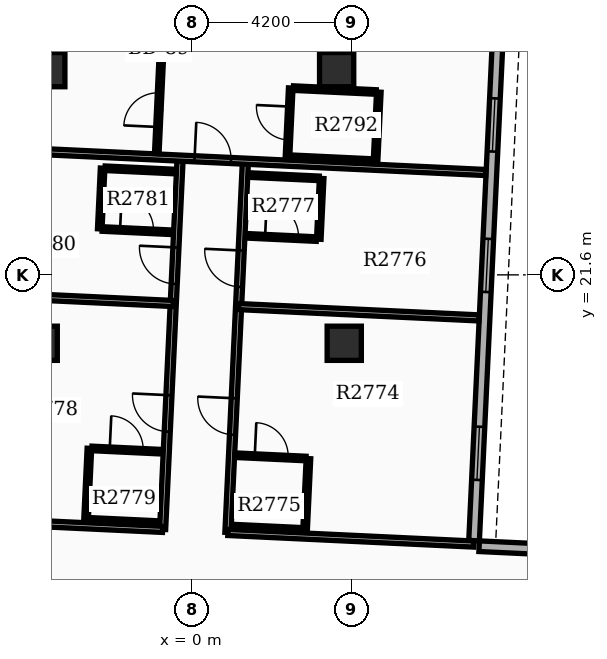
"""IFC4 building model, lengths in metres.
Left out: names, types, materials, properties, quantities, classifications, styles, units other than length and angle.
Written with IfcOpenShell. Run it as: python <this file> out.ifc"""

import sys

from ifc_helpers import new_model, si_unit, direction, frame, frame_2d, origin, origin_2d, place, context, subcontext, project, spatial, rectangle, extrude, element, fill, save


model = new_model("IFC4")
c1 = context("Model", 3, precision=1e-05, world=origin(), true_north=direction((0.0, 1.0)))
c2 = subcontext(c1, "Body", "Model", "MODEL_VIEW")
j1 = project(units=[si_unit("LENGTHUNIT", "METRE"), si_unit("PLANEANGLEUNIT", "RADIAN")], contexts=[c1])
p1 = place(None, origin())
s1 = spatial("IfcSite", under=j1, at=p1, CompositionType="ELEMENT")
p2 = place(p1, origin())
s2 = spatial("IfcBuilding", under=s1, at=p2, CompositionType="ELEMENT")
p3 = place(p2, frame((0.0, 0.0, 172.2)))
s3 = spatial("IfcBuildingStorey", under=s2, at=p3, CompositionType="ELEMENT", Elevation=172.2)
for number, where, z_axis, x_axis in (
    (1, (-4.0, 19.8, 0.0), (0.0, 0.0, 1.0), (1.0, 0.0, 0.0)),
    (2, (4.0, 19.8, 0.0), (0.0, 0.0, 1.0), (1.0, 0.0, 0.0)),
    (3, (-3.8, 27.0, 0.0), (0.0, 0.0, 1.0), (1.0, 0.0, 0.0)),
    (4, (3.8, 27.0, 0.0), (0.0, 0.0, 1.0), (1.0, 0.0, 0.0)),
):
    element("IfcColumn", number, at=place(p3, frame(where, z_axis=z_axis, x_axis=x_axis)), inside=s3, PredefinedType="COLUMN", context=c2, shape_type="SweptSolid", body=[
        extrude(rectangle(XDim=0.9, YDim=0.9, at=origin_2d()), origin(), (0.0, 0.0, 1.0), 3.9),
    ])
p4 = place(p3, frame((7.416, 14.607, 0.0), z_axis=(0.0, 0.0, 1.0), x_axis=(0.047103473814, 0.998890015344, 0.0)))
e5 = element("IfcWall", 5, at=p4, inside=s3, PredefinedType="STANDARD", context=c2, shape_type="SweptSolid", body=[
    extrude(rectangle(XDim=20.1, YDim=0.28, at=frame_2d((10.05, 0.0))), origin(), (0.0, 0.0, 1.0), 2.97),
])
p5 = place(p4, frame((1.6, 0.0, 0.8)))
e6 = element("IfcOpeningElement", 6, at=p5, cuts=e5, PredefinedType="OPENING", context=c2, shape_type="SweptSolid", body=[
    extrude(rectangle(XDim=1.4, YDim=1.6, at=frame_2d((0.7, 0.8))), frame((0.0, 0.15, 0.0), z_axis=(0.0, -1.0, 0.0), x_axis=(1.0, 0.0, 0.0)), (0.0, 0.0, 1.0), 0.3),
])
p6 = place(p4, frame((6.55, 0.0, 0.8)))
e7 = element("IfcOpeningElement", 7, at=p6, cuts=e5, PredefinedType="OPENING", context=c2, shape_type="SweptSolid", body=[
    extrude(rectangle(XDim=1.4, YDim=1.6, at=frame_2d((0.7, 0.8))), frame((0.0, 0.15, 0.0), z_axis=(0.0, -1.0, 0.0), x_axis=(1.0, 0.0, 0.0)), (0.0, 0.0, 1.0), 0.3),
])
p7 = place(p4, frame((10.25, 0.0, 0.8)))
e8 = element("IfcOpeningElement", 8, at=p7, cuts=e5, PredefinedType="OPENING", context=c2, shape_type="SweptSolid", body=[
    extrude(rectangle(XDim=1.4, YDim=1.6, at=frame_2d((0.7, 0.8))), frame((0.0, 0.15, 0.0), z_axis=(0.0, -1.0, 0.0), x_axis=(1.0, 0.0, 0.0)), (0.0, 0.0, 1.0), 0.3),
])
p8 = place(p4, frame((13.45, 0.0, 0.8)))
e9 = element("IfcOpeningElement", 9, at=p8, cuts=e5, PredefinedType="OPENING", context=c2, shape_type="SweptSolid", body=[
    extrude(rectangle(XDim=1.4, YDim=1.6, at=frame_2d((0.7, 0.8))), frame((0.0, 0.15, 0.0), z_axis=(0.0, -1.0, 0.0), x_axis=(1.0, 0.0, 0.0)), (0.0, 0.0, 1.0), 0.3),
])
p9 = place(p3, frame((13.843, 14.164, 0.0), z_axis=(0.0, 0.0, 1.0), x_axis=(-0.998889082162, 0.047123258997, 0.0)))
e10 = element("IfcWall", 10, at=p9, inside=s3, PredefinedType="STANDARD", context=c2, shape_type="SweptSolid", body=[
    extrude(rectangle(XDim=6.3, YDim=0.28, at=frame_2d((3.15, 0.0))), origin(), (0.0, 0.0, 1.0), 2.97),
])
p10 = place(p3, frame((0.939, 14.822, 0.0), z_axis=(0.0, 0.0, 1.0), x_axis=(0.047116711769, 0.99888939101, 0.0)))
e11 = element("IfcWall", 11, at=p10, inside=s3, PredefinedType="PARTITIONING", context=c2, shape_type="SweptSolid", body=[
    extrude(rectangle(XDim=9.7, YDim=0.16, at=frame_2d((4.85, 0.0))), origin(), (0.0, 0.0, 1.0), 2.96),
])
p11 = place(p10, frame((2.575, 0.0, 0.0)))
e12 = element("IfcOpeningElement", 12, at=p11, cuts=e11, PredefinedType="OPENING", context=c2, shape_type="SweptSolid", body=[
    extrude(rectangle(XDim=0.96, YDim=2.15, at=frame_2d((0.48, 1.075))), frame((0.0, 0.09, 0.0), z_axis=(0.0, -1.0, 0.0), x_axis=(1.0, 0.0, 0.0)), (0.0, 0.0, 1.0), 0.18),
])
p12 = place(p10, frame((6.467, 0.0, 0.0)))
e13 = element("IfcOpeningElement", 13, at=p12, cuts=e11, PredefinedType="OPENING", context=c2, shape_type="SweptSolid", body=[
    extrude(rectangle(XDim=0.96, YDim=2.15, at=frame_2d((0.48, 1.075))), frame((0.0, 0.09, 0.0), z_axis=(0.0, -1.0, 0.0), x_axis=(1.0, 0.0, 0.0)), (0.0, 0.0, 1.0), 0.18),
])
p13 = place(p3, frame((0.939, 14.822, 0.0), z_axis=(0.0, 0.0, 1.0), x_axis=(0.998890444558, -0.047094370901, 0.0)))
e14 = element("IfcWall", 14, at=p13, inside=s3, PredefinedType="PARTITIONING", context=c2, shape_type="SweptSolid", body=[
    extrude(rectangle(XDim=6.48, YDim=0.16, at=frame_2d((3.24, 0.0))), origin(), (0.0, 0.0, 1.0), 2.96),
])
p14 = place(p3, frame((1.219, 20.766, 0.0), z_axis=(0.0, 0.0, 1.0), x_axis=(0.998889408842, -0.047116333717, 0.0)))
e15 = element("IfcWall", 15, at=p14, inside=s3, PredefinedType="PARTITIONING", context=c2, shape_type="SweptSolid", body=[
    extrude(rectangle(XDim=6.332, YDim=0.16, at=frame_2d((3.166, 0.0))), origin(), (0.0, 0.0, 1.0), 2.96),
])
p15 = place(p3, frame((1.175, 16.853, 0.0), z_axis=(0.0, 0.0, 1.0), x_axis=(0.998890786574, -0.047087116047, 0.0)))
e16 = element("IfcWall", 16, at=p15, inside=s3, PredefinedType="PARTITIONING", context=c2, shape_type="SweptSolid", body=[
    extrude(rectangle(XDim=1.82, YDim=0.12, at=frame_2d((0.91, 0.0))), origin(), (0.0, 0.0, 1.0), 2.96),
])
p16 = place(p15, frame((0.47, 0.0, 0.0)))
e17 = element("IfcOpeningElement", 17, at=p16, cuts=e16, PredefinedType="OPENING", context=c2, shape_type="SweptSolid", body=[
    extrude(rectangle(XDim=0.88, YDim=2.1, at=frame_2d((0.44, 1.05))), frame((0.0, 0.07, 0.0), z_axis=(0.0, -1.0, 0.0), x_axis=(1.0, 0.0, 0.0)), (0.0, 0.0, 1.0), 0.14),
])
p17 = place(p3, frame((1.087, 14.975, 0.0), z_axis=(0.0, 0.0, 1.0), x_axis=(0.998890786574, -0.047087116047, 0.0)))
e18 = element("IfcWall", 18, at=p17, inside=s3, PredefinedType="PARTITIONING", context=c2, shape_type="SweptSolid", body=[
    extrude(rectangle(XDim=1.82, YDim=0.12, at=frame_2d((0.91, 0.0))), origin(), (0.0, 0.0, 1.0), 2.96),
])
p18 = place(p3, frame((2.969, 14.887, 0.0), z_axis=(0.0, 0.0, 1.0), x_axis=(0.047139425368, 0.998888319371, 0.0)))
e19 = element("IfcWall", 19, at=p18, inside=s3, PredefinedType="PARTITIONING", context=c2, shape_type="SweptSolid", body=[
    extrude(rectangle(XDim=1.88, YDim=0.12, at=frame_2d((0.94, 0.0))), origin(), (0.0, 0.0, 1.0), 2.96),
])
p19 = place(p3, frame((1.448, 22.627, 0.0), z_axis=(0.0, 0.0, 1.0), x_axis=(0.998890786574, -0.047087116047, 0.0)))
e20 = element("IfcWall", 20, at=p19, inside=s3, PredefinedType="PARTITIONING", context=c2, shape_type="SweptSolid", body=[
    extrude(rectangle(XDim=1.82, YDim=0.12, at=frame_2d((0.91, 0.0))), origin(), (0.0, 0.0, 1.0), 2.96),
])
p20 = place(p19, frame((0.47, 0.0, 0.0)))
e21 = element("IfcOpeningElement", 21, at=p20, cuts=e20, PredefinedType="OPENING", context=c2, shape_type="SweptSolid", body=[
    extrude(rectangle(XDim=0.88, YDim=2.1, at=frame_2d((0.44, 1.05))), frame((0.0, 0.07, 0.0), z_axis=(0.0, -1.0, 0.0), x_axis=(1.0, 0.0, 0.0)), (0.0, 0.0, 1.0), 0.14),
])
p21 = place(p3, frame((1.523, 24.225, 0.0), z_axis=(0.0, 0.0, 1.0), x_axis=(0.998890786574, -0.047087116047, 0.0)))
e22 = element("IfcWall", 22, at=p21, inside=s3, PredefinedType="PARTITIONING", context=c2, shape_type="SweptSolid", body=[
    extrude(rectangle(XDim=1.82, YDim=0.12, at=frame_2d((0.91, 0.0))), origin(), (0.0, 0.0, 1.0), 2.96),
])
p22 = place(p3, frame((3.33, 22.538, 0.0), z_axis=(0.0, 0.0, 1.0), x_axis=(0.047144709581, 0.998888069985, 0.0)))
e23 = element("IfcWall", 23, at=p22, inside=s3, PredefinedType="PARTITIONING", context=c2, shape_type="SweptSolid", body=[
    extrude(rectangle(XDim=1.6, YDim=0.12, at=frame_2d((0.8, 0.0))), origin(), (0.0, 0.0, 1.0), 2.96),
])
p23 = place(p3, frame((-0.779, 14.903, 0.0), z_axis=(0.0, 0.0, 1.0), x_axis=(0.047091598416, 0.998890575268, 0.0)))
e24 = element("IfcWall", 24, at=p23, inside=s3, PredefinedType="PARTITIONING", context=c2, shape_type="SweptSolid", body=[
    extrude(rectangle(XDim=9.7, YDim=0.16, at=frame_2d((4.85, 0.0))), origin(), (0.0, 0.0, 1.0), 2.96),
])
p24 = place(p23, frame((2.575, 0.0, 0.0)))
e25 = element("IfcOpeningElement", 25, at=p24, cuts=e24, PredefinedType="OPENING", context=c2, shape_type="SweptSolid", body=[
    extrude(rectangle(XDim=0.96, YDim=2.15, at=frame_2d((0.48, 1.075))), frame((0.0, 0.09, 0.0), z_axis=(0.0, -1.0, 0.0), x_axis=(1.0, 0.0, 0.0)), (0.0, 0.0, 1.0), 0.18),
])
p25 = place(p23, frame((6.467, 0.0, 0.0)))
e26 = element("IfcOpeningElement", 26, at=p25, cuts=e24, PredefinedType="OPENING", context=c2, shape_type="SweptSolid", body=[
    extrude(rectangle(XDim=0.96, YDim=2.15, at=frame_2d((0.48, 1.075))), frame((0.0, 0.09, 0.0), z_axis=(0.0, -1.0, 0.0), x_axis=(1.0, 0.0, 0.0)), (0.0, 0.0, 1.0), 0.18),
])
p26 = place(p3, frame((-0.779, 14.903, 0.0), z_axis=(0.0, 0.0, 1.0), x_axis=(-0.998889957338, 0.047104703898, 0.0)))
e27 = element("IfcWall", 27, at=p26, inside=s3, PredefinedType="PARTITIONING", context=c2, shape_type="SweptSolid", body=[
    extrude(rectangle(XDim=5.24, YDim=0.16, at=frame_2d((2.62, 0.0))), origin(), (0.0, 0.0, 1.0), 2.96),
])
p27 = place(p3, frame((-0.499, 20.847, 0.0), z_axis=(0.0, 0.0, 1.0), x_axis=(-0.998891017342, 0.047082220362, 0.0)))
e28 = element("IfcWall", 28, at=p27, inside=s3, PredefinedType="PARTITIONING", context=c2, shape_type="SweptSolid", body=[
    extrude(rectangle(XDim=5.092, YDim=0.16, at=frame_2d((2.546, 0.0))), origin(), (0.0, 0.0, 1.0), 2.96),
])
p28 = place(p3, frame((-2.641, 17.033, 0.0), z_axis=(0.0, 0.0, 1.0), x_axis=(0.998891083954, -0.047080807099, 0.0)))
e29 = element("IfcWall", 29, at=p28, inside=s3, PredefinedType="PARTITIONING", context=c2, shape_type="SweptSolid", body=[
    extrude(rectangle(XDim=1.82, YDim=0.12, at=frame_2d((0.91, 0.0))), origin(), (0.0, 0.0, 1.0), 2.96),
])
p29 = place(p28, frame((0.47, 0.0, 0.0)))
e30 = element("IfcOpeningElement", 30, at=p29, cuts=e29, PredefinedType="OPENING", context=c2, shape_type="SweptSolid", body=[
    extrude(rectangle(XDim=0.88, YDim=2.1, at=frame_2d((0.44, 1.05))), frame((0.0, 0.07, 0.0), z_axis=(0.0, -1.0, 0.0), x_axis=(1.0, 0.0, 0.0)), (0.0, 0.0, 1.0), 0.14),
])
p30 = place(p3, frame((-2.729, 15.156, 0.0), z_axis=(0.0, 0.0, 1.0), x_axis=(0.998884467853, -0.047220968666, 0.0)))
e31 = element("IfcWall", 31, at=p30, inside=s3, PredefinedType="PARTITIONING", context=c2, shape_type="SweptSolid", body=[
    extrude(rectangle(XDim=1.82, YDim=0.12, at=frame_2d((0.91, 0.0))), origin(), (0.0, 0.0, 1.0), 2.96),
])
p31 = place(p3, frame((-2.794, 15.158, 0.0), z_axis=(0.0, 0.0, 1.0), x_axis=(0.04700985207, 0.998894425757, 0.0)))
e32 = element("IfcWall", 32, at=p31, inside=s3, PredefinedType="PARTITIONING", context=c2, shape_type="SweptSolid", body=[
    extrude(rectangle(XDim=1.88, YDim=0.12, at=frame_2d((0.94, 0.0))), origin(), (0.0, 0.0, 1.0), 2.96),
])
p32 = place(p3, frame((-2.368, 22.807, 0.0), z_axis=(0.0, 0.0, 1.0), x_axis=(0.998891083954, -0.047080807099, 0.0)))
e33 = element("IfcWall", 33, at=p32, inside=s3, PredefinedType="PARTITIONING", context=c2, shape_type="SweptSolid", body=[
    extrude(rectangle(XDim=1.82, YDim=0.12, at=frame_2d((0.91, 0.0))), origin(), (0.0, 0.0, 1.0), 2.96),
])
p33 = place(p32, frame((0.47, 0.0, 0.0)))
e34 = element("IfcOpeningElement", 34, at=p33, cuts=e33, PredefinedType="OPENING", context=c2, shape_type="SweptSolid", body=[
    extrude(rectangle(XDim=0.88, YDim=2.1, at=frame_2d((0.44, 1.05))), frame((0.0, 0.07, 0.0), z_axis=(0.0, -1.0, 0.0), x_axis=(1.0, 0.0, 0.0)), (0.0, 0.0, 1.0), 0.14),
])
p34 = place(p3, frame((-2.293, 24.405, 0.0), z_axis=(0.0, 0.0, 1.0), x_axis=(0.998891083954, -0.047080807099, 0.0)))
e35 = element("IfcWall", 35, at=p34, inside=s3, PredefinedType="PARTITIONING", context=c2, shape_type="SweptSolid", body=[
    extrude(rectangle(XDim=1.82, YDim=0.12, at=frame_2d((0.91, 0.0))), origin(), (0.0, 0.0, 1.0), 2.96),
])
p35 = place(p3, frame((-2.433, 22.81, 0.0), z_axis=(0.0, 0.0, 1.0), x_axis=(0.046992475174, 0.998895243395, 0.0)))
e36 = element("IfcWall", 36, at=p35, inside=s3, PredefinedType="PARTITIONING", context=c2, shape_type="SweptSolid", body=[
    extrude(rectangle(XDim=1.6, YDim=0.12, at=frame_2d((0.8, 0.0))), origin(), (0.0, 0.0, 1.0), 2.96),
])
p36 = place(p3, frame((-5.405, 24.912, 0.0), z_axis=(0.0, 0.0, 1.0), x_axis=(0.998889967692, -0.047104484326, 0.0)))
e37 = element("IfcWall", 37, at=p36, inside=s3, PredefinedType="PARTITIONING", context=c2, shape_type="SweptSolid", body=[
    extrude(rectangle(XDim=13.144, YDim=0.16, at=frame_2d((6.572, 0.0))), origin(), (0.0, 0.0, 1.0), 2.96),
])
p37 = place(p36, frame((5.472, 0.0, 0.0)))
e38 = element("IfcOpeningElement", 38, at=p37, cuts=e37, PredefinedType="OPENING", context=c2, shape_type="SweptSolid", body=[
    extrude(rectangle(XDim=0.96, YDim=2.15, at=frame_2d((0.48, 1.075))), frame((0.0, 0.09, 0.0), z_axis=(0.0, -1.0, 0.0), x_axis=(1.0, 0.0, 0.0)), (0.0, 0.0, 1.0), 0.18),
])
p38 = place(p3, frame((-0.933, 24.792, 0.0), z_axis=(0.0, 0.0, 1.0), x_axis=(0.047090456762, 0.998890629089, 0.0)))
e39 = element("IfcWall", 39, at=p38, inside=s3, PredefinedType="PARTITIONING", context=c2, shape_type="SweptSolid", body=[
    extrude(rectangle(XDim=10.312, YDim=0.12, at=frame_2d((5.156, 0.0))), origin(), (0.0, 0.0, 1.0), 2.96),
])
p39 = place(p38, frame((0.7, 0.0, 0.0)))
e40 = element("IfcOpeningElement", 40, at=p39, cuts=e39, PredefinedType="OPENING", context=c2, shape_type="SweptSolid", body=[
    extrude(rectangle(XDim=0.9, YDim=2.1, at=frame_2d((0.45, 1.05))), frame((0.0, 0.07, 0.0), z_axis=(0.0, -1.0, 0.0), x_axis=(1.0, 0.0, 0.0)), (0.0, 0.0, 1.0), 0.14),
])
p40 = place(p3, frame((2.506, 24.699, 0.0), z_axis=(0.0, 0.0, 1.0), x_axis=(0.047087116047, 0.998890786574, 0.0)))
e41 = element("IfcWall", 41, at=p40, inside=s3, PredefinedType="PARTITIONING", context=c2, shape_type="SweptSolid", body=[
    extrude(rectangle(XDim=1.82, YDim=0.12, at=frame_2d((0.91, 0.0))), origin(), (0.0, 0.0, 1.0), 2.96),
])
p41 = place(p40, frame((0.45, 0.0, 0.0)))
e42 = element("IfcOpeningElement", 42, at=p41, cuts=e41, PredefinedType="OPENING", context=c2, shape_type="SweptSolid", body=[
    extrude(rectangle(XDim=0.88, YDim=2.1, at=frame_2d((0.44, 1.05))), frame((0.0, 0.07, 0.0), z_axis=(0.0, -1.0, 0.0), x_axis=(1.0, 0.0, 0.0)), (0.0, 0.0, 1.0), 0.14),
])
p42 = place(p3, frame((4.824, 24.59, 0.0), z_axis=(0.0, 0.0, 1.0), x_axis=(0.047087116047, 0.998890786574, 0.0)))
e43 = element("IfcWall", 43, at=p42, inside=s3, PredefinedType="PARTITIONING", context=c2, shape_type="SweptSolid", body=[
    extrude(rectangle(XDim=1.82, YDim=0.12, at=frame_2d((0.91, 0.0))), origin(), (0.0, 0.0, 1.0), 2.96),
])
for number, where, z_axis, x_axis in (
    (44, (2.576, 24.696, 0.0), (0.0, 0.0, 1.0), (0.999, -0.047, 0.0)),
    (45, (2.662, 26.514, 0.0), (0.0, 0.0, 1.0), (0.999, -0.047, 0.0)),
):
    element("IfcWall", number, at=place(p3, frame(where, z_axis=z_axis, x_axis=x_axis)), inside=s3, PredefinedType="PARTITIONING", context=c2, shape_type="SweptSolid", body=[
        extrude(rectangle(XDim=2.18, YDim=0.12, at=frame_2d((1.09, 0.0))), origin(), (0.0, 0.0, 1.0), 2.96),
    ])
p43 = place(p5, origin())
e46 = element("IfcWindow", 46, at=p43, inside=s3, PartitioningType="SINGLE_PANEL", PredefinedType="WINDOW", context=c2, shape_type="SweptSolid", body=[
    extrude(rectangle(XDim=1.4, YDim=1.6, at=frame_2d((0.7, 0.8))), frame((0.0, 0.03, 0.0), z_axis=(0.0, -1.0, 0.0), x_axis=(1.0, 0.0, 0.0)), (0.0, 0.0, 1.0), 0.06),
])
fill(e6, e46)
p44 = place(p6, origin())
e47 = element("IfcWindow", 47, at=p44, inside=s3, PartitioningType="SINGLE_PANEL", PredefinedType="WINDOW", context=c2, shape_type="SweptSolid", body=[
    extrude(rectangle(XDim=1.4, YDim=1.6, at=frame_2d((0.7, 0.8))), frame((0.0, 0.03, 0.0), z_axis=(0.0, -1.0, 0.0), x_axis=(1.0, 0.0, 0.0)), (0.0, 0.0, 1.0), 0.06),
])
fill(e7, e47)
p45 = place(p7, origin())
e48 = element("IfcWindow", 48, at=p45, inside=s3, PartitioningType="SINGLE_PANEL", PredefinedType="WINDOW", context=c2, shape_type="SweptSolid", body=[
    extrude(rectangle(XDim=1.4, YDim=1.6, at=frame_2d((0.7, 0.8))), frame((0.0, 0.03, 0.0), z_axis=(0.0, -1.0, 0.0), x_axis=(1.0, 0.0, 0.0)), (0.0, 0.0, 1.0), 0.06),
])
fill(e8, e48)
p46 = place(p11, origin())
e49 = element("IfcDoor", 49, at=p46, inside=s3, OperationType="SINGLE_SWING_RIGHT", PredefinedType="DOOR", context=c2, shape_type="SweptSolid", body=[
    extrude(rectangle(XDim=0.96, YDim=2.15, at=frame_2d((0.48, 1.075))), frame((0.0, 0.025, 0.0), z_axis=(0.0, -1.0, 0.0), x_axis=(1.0, 0.0, 0.0)), (0.0, 0.0, 1.0), 0.05),
])
fill(e12, e49)
p47 = place(p16, origin())
e50 = element("IfcDoor", 50, at=p47, inside=s3, OperationType="SINGLE_SWING_LEFT", PredefinedType="DOOR", context=c2, shape_type="SweptSolid", body=[
    extrude(rectangle(XDim=0.88, YDim=2.1, at=frame_2d((0.44, 1.05))), frame((0.0, 0.025, 0.0), z_axis=(0.0, -1.0, 0.0), x_axis=(1.0, 0.0, 0.0)), (0.0, 0.0, 1.0), 0.05),
])
fill(e17, e50)
p48 = place(p12, origin())
e51 = element("IfcDoor", 51, at=p48, inside=s3, OperationType="SINGLE_SWING_RIGHT", PredefinedType="DOOR", context=c2, shape_type="SweptSolid", body=[
    extrude(rectangle(XDim=0.96, YDim=2.15, at=frame_2d((0.48, 1.075))), frame((0.0, 0.025, 0.0), z_axis=(0.0, -1.0, 0.0), x_axis=(1.0, 0.0, 0.0)), (0.0, 0.0, 1.0), 0.05),
])
fill(e13, e51)
p49 = place(p20, origin())
e52 = element("IfcDoor", 52, at=p49, inside=s3, OperationType="SINGLE_SWING_LEFT", PredefinedType="DOOR", context=c2, shape_type="SweptSolid", body=[
    extrude(rectangle(XDim=0.88, YDim=2.1, at=frame_2d((0.44, 1.05))), frame((0.0, 0.025, 0.0), z_axis=(0.0, -1.0, 0.0), x_axis=(1.0, 0.0, 0.0)), (0.0, 0.0, 1.0), 0.05),
])
fill(e21, e52)
p50 = place(p24, origin())
e53 = element("IfcDoor", 53, at=p50, inside=s3, OperationType="SINGLE_SWING_RIGHT", PredefinedType="DOOR", context=c2, shape_type="SweptSolid", body=[
    extrude(rectangle(XDim=0.96, YDim=2.15, at=frame_2d((0.48, 1.075))), frame((0.0, 0.025, 0.0), z_axis=(0.0, -1.0, 0.0), x_axis=(1.0, 0.0, 0.0)), (0.0, 0.0, 1.0), 0.05),
])
fill(e25, e53)
p51 = place(p29, origin())
e54 = element("IfcDoor", 54, at=p51, inside=s3, OperationType="SINGLE_SWING_LEFT", PredefinedType="DOOR", context=c2, shape_type="SweptSolid", body=[
    extrude(rectangle(XDim=0.88, YDim=2.1, at=frame_2d((0.44, 1.05))), frame((0.0, 0.025, 0.0), z_axis=(0.0, -1.0, 0.0), x_axis=(1.0, 0.0, 0.0)), (0.0, 0.0, 1.0), 0.05),
])
fill(e30, e54)
p52 = place(p25, origin())
e55 = element("IfcDoor", 55, at=p52, inside=s3, OperationType="SINGLE_SWING_RIGHT", PredefinedType="DOOR", context=c2, shape_type="SweptSolid", body=[
    extrude(rectangle(XDim=0.96, YDim=2.15, at=frame_2d((0.48, 1.075))), frame((0.0, 0.025, 0.0), z_axis=(0.0, -1.0, 0.0), x_axis=(1.0, 0.0, 0.0)), (0.0, 0.0, 1.0), 0.05),
])
fill(e26, e55)
p53 = place(p33, origin())
e56 = element("IfcDoor", 56, at=p53, inside=s3, OperationType="SINGLE_SWING_LEFT", PredefinedType="DOOR", context=c2, shape_type="SweptSolid", body=[
    extrude(rectangle(XDim=0.88, YDim=2.1, at=frame_2d((0.44, 1.05))), frame((0.0, 0.025, 0.0), z_axis=(0.0, -1.0, 0.0), x_axis=(1.0, 0.0, 0.0)), (0.0, 0.0, 1.0), 0.05),
])
fill(e34, e56)
p54 = place(p37, origin())
e57 = element("IfcDoor", 57, at=p54, inside=s3, OperationType="SINGLE_SWING_LEFT", PredefinedType="DOOR", context=c2, shape_type="SweptSolid", body=[
    extrude(rectangle(XDim=0.96, YDim=2.15, at=frame_2d((0.48, 1.075))), frame((0.0, 0.025, 0.0), z_axis=(0.0, -1.0, 0.0), x_axis=(1.0, 0.0, 0.0)), (0.0, 0.0, 1.0), 0.05),
])
fill(e38, e57)
p55 = place(p39, origin())
e58 = element("IfcDoor", 58, at=p55, inside=s3, OperationType="SINGLE_SWING_LEFT", PredefinedType="DOOR", context=c2, shape_type="SweptSolid", body=[
    extrude(rectangle(XDim=0.9, YDim=2.1, at=frame_2d((0.45, 1.05))), frame((0.0, 0.025, 0.0), z_axis=(0.0, -1.0, 0.0), x_axis=(1.0, 0.0, 0.0)), (0.0, 0.0, 1.0), 0.05),
])
fill(e40, e58)
p56 = place(p41, origin())
e59 = element("IfcDoor", 59, at=p56, inside=s3, OperationType="SINGLE_SWING_RIGHT", PredefinedType="DOOR", context=c2, shape_type="SweptSolid", body=[
    extrude(rectangle(XDim=0.88, YDim=2.1, at=frame_2d((0.44, 1.05))), frame((0.0, 0.025, 0.0), z_axis=(0.0, -1.0, 0.0), x_axis=(1.0, 0.0, 0.0)), (0.0, 0.0, 1.0), 0.05),
])
fill(e42, e59)
save(model, sys.argv[1])
